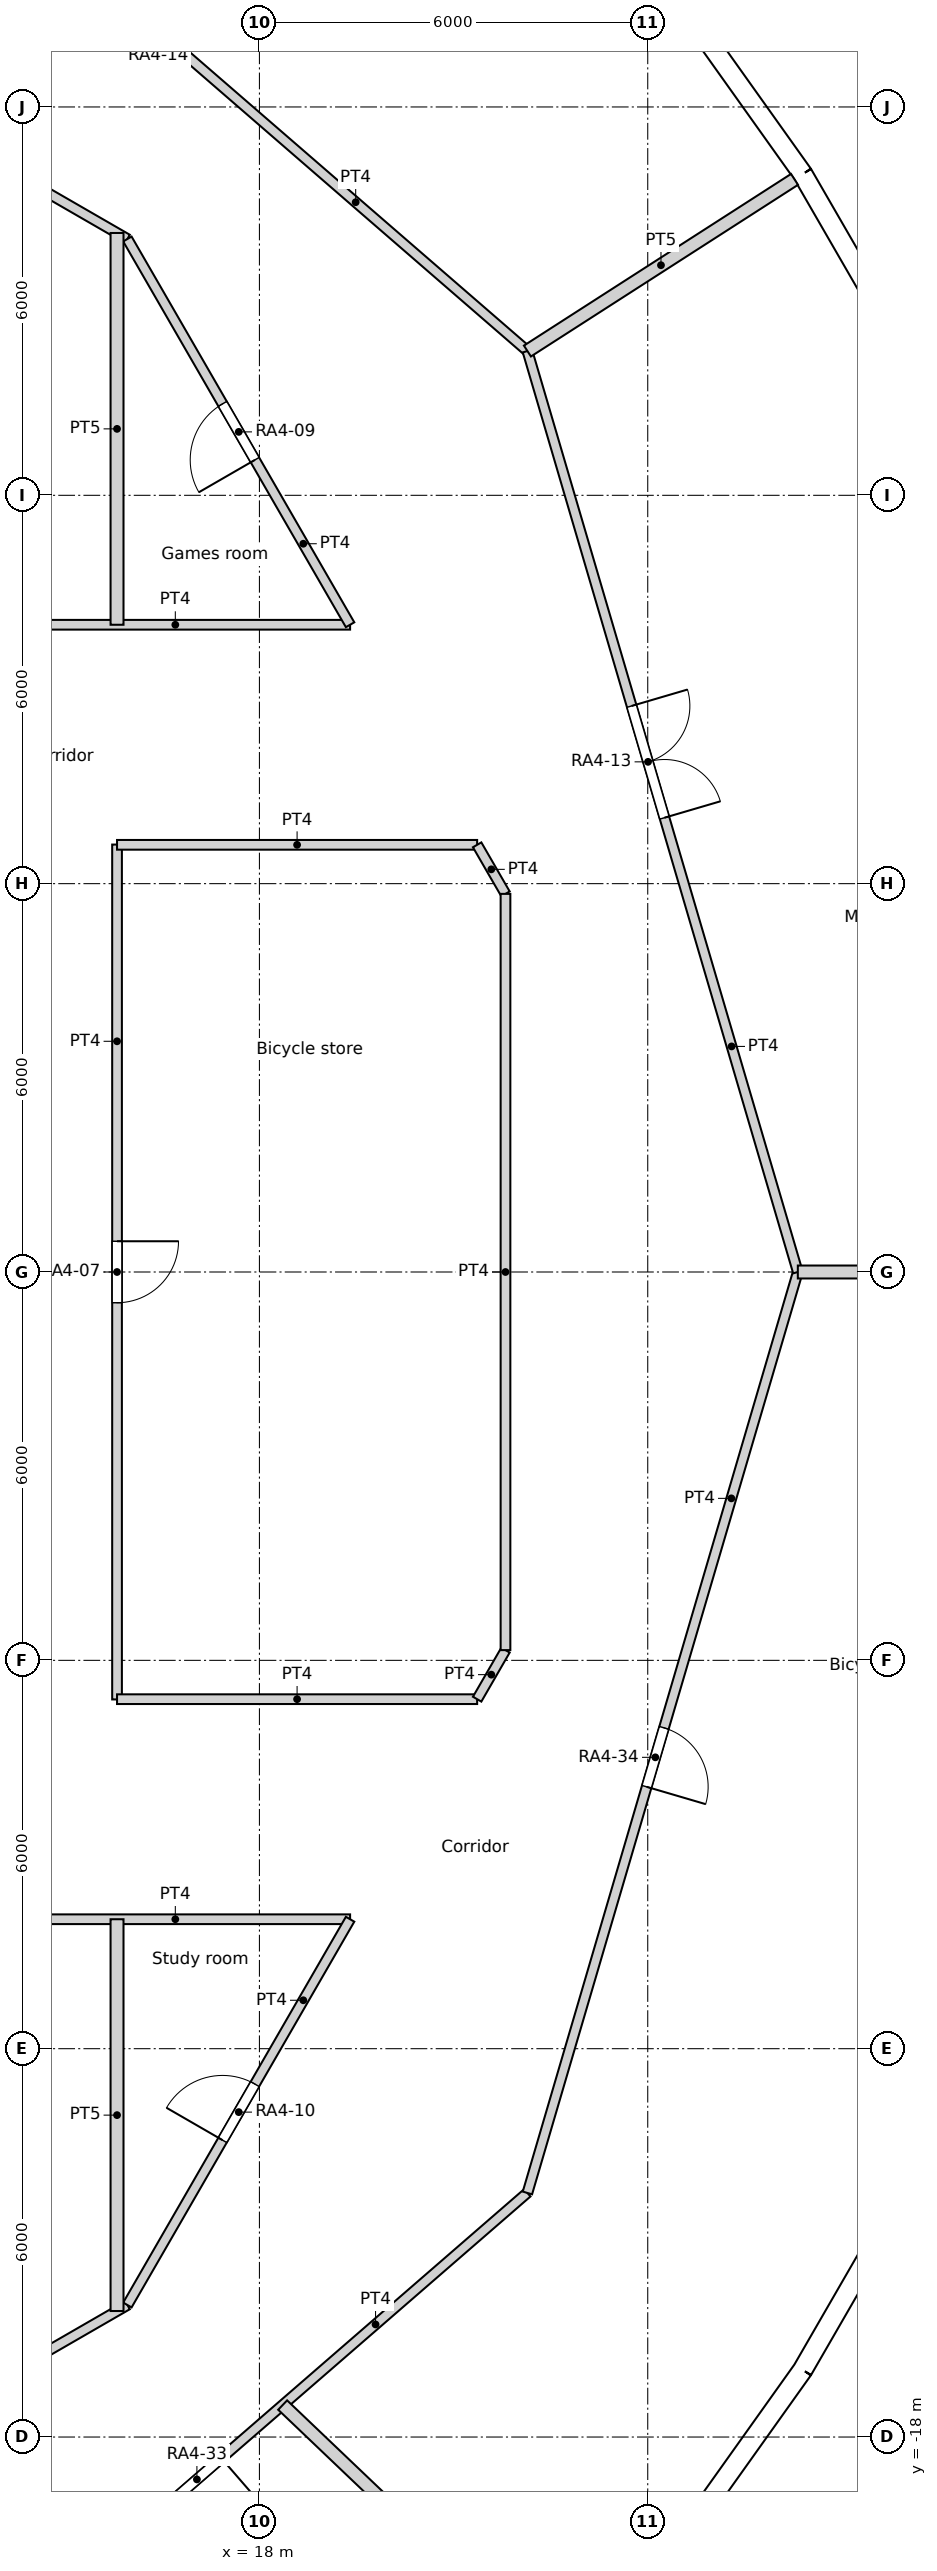
"""IFC4 building model, lengths in metres.
Left out: names, types, materials, properties, quantities, classifications, styles, units other than length and angle.
Written with IfcOpenShell. Run it as: python <this file> out.ifc"""

import sys

from ifc_helpers import new_model, si_unit, direction, frame, frame_2d, origin, origin_2d, place, context, subcontext, project, spatial, rectangle, circle, extrude, element, fill, save


model = new_model("IFC4")
c1 = context("Model", 3, precision=1e-05, world=origin(), true_north=direction((0.0, 1.0)))
c2 = subcontext(c1, "Body", "Model", "MODEL_VIEW")
j1 = project(units=[si_unit("LENGTHUNIT", "METRE"), si_unit("PLANEANGLEUNIT", "RADIAN")], contexts=[c1])
p1 = place(None, origin())
s1 = spatial("IfcSite", under=j1, at=p1, CompositionType="ELEMENT")
p2 = place(p1, origin())
s2 = spatial("IfcBuilding", under=s1, at=p2, CompositionType="ELEMENT")
p3 = place(p2, frame((0.0, 0.0, 60.6)))
s3 = spatial("IfcBuildingStorey", under=s2, at=p3, CompositionType="ELEMENT", Elevation=60.6)
for number, where, z_axis, x_axis in (
    (1, (25.469, 16.368, 0.0), (0.0, 0.0, 1.0), (1.0, 0.0, 0.0)),
    (2, (25.469, -16.368, 0.0), (0.0, 0.0, 1.0), (1.0, 0.0, 0.0)),
):
    element("IfcColumn", number, at=place(p3, frame(where, z_axis=z_axis, x_axis=x_axis)), inside=s3, PredefinedType="COLUMN", context=c2, shape_type="SweptSolid", body=[
        extrude(circle(Radius=0.7, at=origin_2d()), origin(), (0.0, 0.0, 1.0), 3.6),
    ])
for number, where, z_axis, x_axis in (
    (3, (24.548, 0.0, 0.0), (0.0, 0.0, 1.0), (1.0, 0.0, 0.0)),
    (4, (23.886, 5.661, 0.0), (0.0, 0.0, 1.0), (1.0, 0.0, 0.0)),
    (5, (21.937, 11.017, 0.0), (0.0, 0.0, 1.0), (1.0, 0.0, 0.0)),
    (6, (18.805, 15.779, 0.0), (0.0, 0.0, 1.0), (1.0, 0.0, 0.0)),
    (7, (18.805, -15.779, 0.0), (0.0, 0.0, 1.0), (1.0, 0.0, 0.0)),
    (8, (21.937, -11.017, 0.0), (0.0, 0.0, 1.0), (1.0, 0.0, 0.0)),
    (9, (23.886, -5.661, 0.0), (0.0, 0.0, 1.0), (1.0, 0.0, 0.0)),
):
    element("IfcColumn", number, at=place(p3, frame(where, z_axis=z_axis, x_axis=x_axis)), inside=s3, PredefinedType="COLUMN", context=c2, shape_type="SweptSolid", body=[
        extrude(circle(Radius=0.75, at=origin_2d()), origin(), (0.0, 0.0, 1.0), 3.6),
    ])
for number, where, z_axis, x_axis in (
    (10, (18.822, 0.0, 0.0), (0.0, 0.0, 1.0), (1.0, 0.0, 0.0)),
    (11, (17.986, 5.548, 0.0), (0.0, 0.0, 1.0), (1.0, 0.0, 0.0)),
    (12, (15.552, 10.603, 0.0), (0.0, 0.0, 1.0), (1.0, 0.0, 0.0)),
    (13, (15.552, -10.603, 0.0), (0.0, 0.0, 1.0), (1.0, 0.0, 0.0)),
    (14, (17.986, -5.548, 0.0), (0.0, 0.0, 1.0), (1.0, 0.0, 0.0)),
):
    element("IfcColumn", number, at=place(p3, frame(where, z_axis=z_axis, x_axis=x_axis)), inside=s3, PredefinedType="COLUMN", context=c2, shape_type="SweptSolid", body=[
        extrude(circle(Radius=0.8, at=origin_2d()), origin(), (0.0, 0.0, 1.0), 3.6),
    ])
p4 = place(p3, frame((27.884, 14.382, 0.0), z_axis=(0.0, 0.0, 1.0), x_axis=(-0.500025049464, 0.866010940986, 0.0)))
e15 = element("IfcWall", 15, at=p4, inside=s3, PredefinedType="SOLIDWALL", context=c2, shape_type="SweptSolid", body=[
    extrude(rectangle(XDim=2.98, YDim=0.3, at=frame_2d((1.49, 0.0))), origin(), (0.0, 0.0, 1.0), 2.65),
])
p5 = place(p4, frame((1.49, 0.0, 1.55)))
e16 = element("IfcOpeningElement", 16, at=p5, cuts=e15, PredefinedType="OPENING", context=c2, shape_type="SweptSolid", body=[
    extrude(circle(Radius=0.9, at=origin_2d()), frame((0.0, 0.16, 0.0), z_axis=(0.0, -1.0, 0.0), x_axis=(1.0, 0.0, 0.0)), (0.0, 0.0, 1.0), 0.32),
])
p6 = place(p3, frame((26.394, 16.962, 0.0), z_axis=(0.0, 0.0, 1.0), x_axis=(-0.580059407678, 0.81457417315, 0.0)))
e17 = element("IfcWall", 17, at=p6, inside=s3, PredefinedType="SOLIDWALL", context=c2, shape_type="SweptSolid", body=[
    extrude(rectangle(XDim=2.979, YDim=0.3, at=frame_2d((1.49, 0.0))), origin(), (0.0, 0.0, 1.0), 3.15),
])
p7 = place(p6, frame((1.49, 0.0, 1.55)))
e18 = element("IfcOpeningElement", 18, at=p7, cuts=e17, PredefinedType="OPENING", context=c2, shape_type="SweptSolid", body=[
    extrude(circle(Radius=0.9, at=origin_2d()), frame((0.0, 0.16, 0.0), z_axis=(0.0, -1.0, 0.0), x_axis=(1.0, 0.0, 0.0)), (0.0, 0.0, 1.0), 0.32),
])
p8 = place(p3, frame((24.666, -19.389, 0.0), z_axis=(0.0, 0.0, 1.0), x_axis=(0.580059407678, 0.81457417315, 0.0)))
e19 = element("IfcWall", 19, at=p8, inside=s3, PredefinedType="SOLIDWALL", context=c2, shape_type="SweptSolid", body=[
    extrude(rectangle(XDim=2.979, YDim=0.3, at=frame_2d((1.49, 0.0))), origin(), (0.0, 0.0, 1.0), 2.65),
])
p9 = place(p8, frame((1.49, 0.0, 1.55)))
e20 = element("IfcOpeningElement", 20, at=p9, cuts=e19, PredefinedType="OPENING", context=c2, shape_type="SweptSolid", body=[
    extrude(circle(Radius=0.9, at=origin_2d()), frame((0.0, 0.16, 0.0), z_axis=(0.0, -1.0, 0.0), x_axis=(1.0, 0.0, 0.0)), (0.0, 0.0, 1.0), 0.32),
])
p10 = place(p3, frame((26.394, -16.962, 0.0), z_axis=(0.0, 0.0, 1.0), x_axis=(0.500025049464, 0.866010940986, 0.0)))
e21 = element("IfcWall", 21, at=p10, inside=s3, PredefinedType="SOLIDWALL", context=c2, shape_type="SweptSolid", body=[
    extrude(rectangle(XDim=2.98, YDim=0.3, at=frame_2d((1.49, 0.0))), origin(), (0.0, 0.0, 1.0), 3.15),
])
p11 = place(p10, frame((1.49, 0.0, 1.55)))
e22 = element("IfcOpeningElement", 22, at=p11, cuts=e21, PredefinedType="OPENING", context=c2, shape_type="SweptSolid", body=[
    extrude(circle(Radius=0.9, at=origin_2d()), frame((0.0, 0.16, 0.0), z_axis=(0.0, -1.0, 0.0), x_axis=(1.0, 0.0, 0.0)), (0.0, 0.0, 1.0), 0.32),
])
for number, where, z_axis, x_axis in (
    (23, (14.0, 10.0, 0.0), (0.0, 0.0, 1.0), (1.0, 0.0, 0.0)),
    (24, (14.0, -10.0, 0.0), (0.0, 0.0, 1.0), (1.0, 0.0, 0.0)),
):
    element("IfcWall", number, at=place(p3, frame(where, z_axis=z_axis, x_axis=x_axis)), inside=s3, PredefinedType="PARTITIONING", context=c2, shape_type="SweptSolid", body=[
        extrude(rectangle(XDim=5.401, YDim=0.15, at=frame_2d((2.7, 0.0))), origin(), (0.0, 0.0, 1.0), 3.15),
    ])
p12 = place(p3, frame((15.8, -6.604, 0.0), z_axis=(0.0, 0.0, 1.0), x_axis=(0.0, 1.0, 0.0)))
e25 = element("IfcWall", 25, at=p12, inside=s3, PredefinedType="PARTITIONING", context=c2, shape_type="SweptSolid", body=[
    extrude(rectangle(XDim=13.208, YDim=0.15, at=frame_2d((6.604, 0.0))), origin(), (0.0, 0.0, 1.0), 3.15),
])
p13 = place(p12, frame((6.129, 0.0, 0.0)))
e26 = element("IfcOpeningElement", 26, at=p13, cuts=e25, PredefinedType="OPENING", context=c2, shape_type="SweptSolid", body=[
    extrude(rectangle(XDim=0.95, YDim=2.1, at=frame_2d((0.475, 1.05))), frame((0.0, 0.075, 0.0), z_axis=(0.0, -1.0, 0.0), x_axis=(1.0, 0.0, 0.0)), (0.0, 0.0, 1.0), 0.15),
])
p14 = place(p3, frame((15.8, -6.6, 0.0), z_axis=(0.0, 0.0, 1.0), x_axis=(1.0, 0.0, 0.0)))
e27 = element("IfcWall", 27, at=p14, inside=s3, PredefinedType="PARTITIONING", context=c2, shape_type="SweptSolid", body=[
    extrude(rectangle(XDim=5.564, YDim=0.15, at=frame_2d((2.782, 0.0))), origin(), (0.0, 0.0, 1.0), 3.15),
])
p15 = place(p3, frame((21.364, -6.6, 0.0), z_axis=(0.0, 0.0, 1.0), x_axis=(0.500277597875, 0.865865073245, 0.0)))
e28 = element("IfcWall", 28, at=p15, inside=s3, PredefinedType="PARTITIONING", context=c2, shape_type="SweptSolid", body=[
    extrude(rectangle(XDim=0.875, YDim=0.15, at=frame_2d((0.438, 0.0))), origin(), (0.0, 0.0, 1.0), 3.15),
])
p16 = place(p3, frame((21.802, -5.842, 0.0), z_axis=(0.0, 0.0, 1.0), x_axis=(0.0, 1.0, 0.0)))
e29 = element("IfcWall", 29, at=p16, inside=s3, PredefinedType="PARTITIONING", context=c2, shape_type="SweptSolid", body=[
    extrude(rectangle(XDim=11.684, YDim=0.15, at=frame_2d((5.842, 0.0))), origin(), (0.0, 0.0, 1.0), 3.15),
])
p17 = place(p3, frame((21.364, 6.6, 0.0), z_axis=(0.0, 0.0, 1.0), x_axis=(0.500277597875, -0.865865073245, 0.0)))
e30 = element("IfcWall", 30, at=p17, inside=s3, PredefinedType="PARTITIONING", context=c2, shape_type="SweptSolid", body=[
    extrude(rectangle(XDim=0.875, YDim=0.15, at=frame_2d((0.438, 0.0))), origin(), (0.0, 0.0, 1.0), 3.15),
])
p18 = place(p3, frame((15.8, 6.6, 0.0), z_axis=(0.0, 0.0, 1.0), x_axis=(1.0, 0.0, 0.0)))
e31 = element("IfcWall", 31, at=p18, inside=s3, PredefinedType="PARTITIONING", context=c2, shape_type="SweptSolid", body=[
    extrude(rectangle(XDim=5.564, YDim=0.15, at=frame_2d((2.782, 0.0))), origin(), (0.0, 0.0, 1.0), 3.15),
])
p19 = place(p3, frame((15.96, 15.96, 0.0), z_axis=(0.0, 0.0, 1.0), x_axis=(0.499992689227, -0.86602962462, 0.0)))
e32 = element("IfcWall", 32, at=p19, inside=s3, PredefinedType="PARTITIONING", context=c2, shape_type="SweptSolid", body=[
    extrude(rectangle(XDim=6.882, YDim=0.15, at=frame_2d((3.441, 0.0))), origin(), (0.0, 0.0, 1.0), 3.15),
])
p20 = place(p19, frame((2.941, 0.0, 0.0)))
e33 = element("IfcOpeningElement", 33, at=p20, cuts=e32, PredefinedType="OPENING", context=c2, shape_type="SweptSolid", body=[
    extrude(rectangle(XDim=1.0, YDim=2.04, at=frame_2d((0.5, 1.02))), frame((0.0, 0.075, 0.0), z_axis=(0.0, -1.0, 0.0), x_axis=(1.0, 0.0, 0.0)), (0.0, 0.0, 1.0), 0.15),
])
p21 = place(p3, frame((15.96, -15.96, 0.0), z_axis=(0.0, 0.0, 1.0), x_axis=(0.499992689227, 0.86602962462, 0.0)))
e34 = element("IfcWall", 34, at=p21, inside=s3, PredefinedType="PARTITIONING", context=c2, shape_type="SweptSolid", body=[
    extrude(rectangle(XDim=6.882, YDim=0.15, at=frame_2d((3.441, 0.0))), origin(), (0.0, 0.0, 1.0), 3.15),
])
p22 = place(p21, frame((2.941, 0.0, 0.0)))
e35 = element("IfcOpeningElement", 35, at=p22, cuts=e34, PredefinedType="OPENING", context=c2, shape_type="SweptSolid", body=[
    extrude(rectangle(XDim=1.0, YDim=2.04, at=frame_2d((0.5, 1.02))), frame((0.0, 0.075, 0.0), z_axis=(0.0, -1.0, 0.0), x_axis=(1.0, 0.0, 0.0)), (0.0, 0.0, 1.0), 0.15),
])
p23 = place(p3, frame((22.141, 14.229, 0.0), z_axis=(0.0, 0.0, 1.0), x_axis=(0.281730446162, -0.959493593363, 0.0)))
e36 = element("IfcWall", 36, at=p23, inside=s3, PredefinedType="PARTITIONING", context=c2, shape_type="SweptSolid", body=[
    extrude(rectangle(XDim=14.83, YDim=0.15, at=frame_2d((7.415, 0.0))), origin(), (0.0, 0.0, 1.0), 3.15),
])
p24 = place(p23, frame((5.715, 0.0, 0.0)))
e37 = element("IfcOpeningElement", 37, at=p24, cuts=e36, PredefinedType="OPENING", context=c2, shape_type="SweptSolid", body=[
    extrude(rectangle(XDim=1.8, YDim=2.1, at=frame_2d((0.9, 1.05))), frame((0.0, 0.075, 0.0), z_axis=(0.0, -1.0, 0.0), x_axis=(1.0, 0.0, 0.0)), (0.0, 0.0, 1.0), 0.15),
])
p25 = place(p3, frame((10.933, 23.94, 0.0), z_axis=(0.0, 0.0, 1.0), x_axis=(0.755770011705, -0.654837147242, 0.0)))
e38 = element("IfcWall", 38, at=p25, inside=s3, PredefinedType="PARTITIONING", context=c2, shape_type="SweptSolid", body=[
    extrude(rectangle(XDim=14.83, YDim=0.15, at=frame_2d((7.415, 0.0))), origin(), (0.0, 0.0, 1.0), 3.15),
])
p26 = place(p25, frame((6.807, 0.0, 0.0)))
e39 = element("IfcOpeningElement", 39, at=p26, cuts=e38, PredefinedType="OPENING", context=c2, shape_type="SweptSolid", body=[
    extrude(rectangle(XDim=0.95, YDim=2.1, at=frame_2d((0.475, 1.05))), frame((0.0, 0.075, 0.0), z_axis=(0.0, -1.0, 0.0), x_axis=(1.0, 0.0, 0.0)), (0.0, 0.0, 1.0), 0.15),
])
p27 = place(p3, frame((13.247, -21.939, 0.0), z_axis=(0.0, 0.0, 1.0), x_axis=(0.755420750547, 0.655240024451, 0.0)))
e40 = element("IfcWall", 40, at=p27, inside=s3, PredefinedType="PARTITIONING", context=c2, shape_type="SweptSolid", body=[
    extrude(rectangle(XDim=11.771, YDim=0.15, at=frame_2d((5.885, 0.0))), origin(), (0.0, 0.0, 1.0), 3.15),
])
p28 = place(p27, frame((4.513, 0.0, 0.0)))
e41 = element("IfcOpeningElement", 41, at=p28, cuts=e40, PredefinedType="OPENING", context=c2, shape_type="SweptSolid", body=[
    extrude(rectangle(XDim=1.0, YDim=2.1, at=frame_2d((0.5, 1.05))), frame((0.0, 0.075, 0.0), z_axis=(0.0, -1.0, 0.0), x_axis=(1.0, 0.0, 0.0)), (0.0, 0.0, 1.0), 0.15),
])
p29 = place(p3, frame((22.141, -14.229, 0.0), z_axis=(0.0, 0.0, 1.0), x_axis=(0.281730446162, 0.959493593363, 0.0)))
e42 = element("IfcWall", 42, at=p29, inside=s3, PredefinedType="PARTITIONING", context=c2, shape_type="SweptSolid", body=[
    extrude(rectangle(XDim=14.83, YDim=0.15, at=frame_2d((7.415, 0.0))), origin(), (0.0, 0.0, 1.0), 3.15),
])
p30 = place(p29, frame((6.54, 0.0, 0.0)))
e43 = element("IfcOpeningElement", 43, at=p30, cuts=e42, PredefinedType="OPENING", context=c2, shape_type="SweptSolid", body=[
    extrude(rectangle(XDim=0.95, YDim=2.1, at=frame_2d((0.475, 1.05))), frame((0.0, 0.075, 0.0), z_axis=(0.0, -1.0, 0.0), x_axis=(1.0, 0.0, 0.0)), (0.0, 0.0, 1.0), 0.15),
])
for number, where, z_axis, x_axis in (
    (44, (11.336, 18.63, 0.0), (0.0, 0.0, 1.0), (0.866, -0.5, 0.0)),
    (45, (11.336, -18.63, 0.0), (0.0, 0.0, 1.0), (0.866, 0.5, 0.0)),
):
    element("IfcWall", number, at=place(p3, frame(where, z_axis=z_axis, x_axis=x_axis)), inside=s3, PredefinedType="PARTITIONING", context=c2, shape_type="SweptSolid", body=[
        extrude(rectangle(XDim=5.339, YDim=0.15, at=frame_2d((2.67, 0.0))), origin(), (0.0, 0.0, 1.0), 3.15),
    ])
for number, where, z_axis, x_axis in (
    (46, (15.8, 10.0, 0.0), (0.0, 0.0, 1.0), (0.0, 1.0, 0.0)),
    (47, (15.8, -16.053, 0.0), (0.0, 0.0, 1.0), (0.0, 1.0, 0.0)),
):
    element("IfcWall", number, at=place(p3, frame(where, z_axis=z_axis, x_axis=x_axis)), inside=s3, PredefinedType="PARTITIONING", context=c2, shape_type="SweptSolid", body=[
        extrude(rectangle(XDim=6.053, YDim=0.2, at=frame_2d((3.026, 0.0))), origin(), (0.0, 0.0, 1.0), 3.15),
    ])
p31 = place(p3, frame((22.141, 14.229, 0.0), z_axis=(0.0, 0.0, 1.0), x_axis=(0.841265781699, 0.540621757371, 0.0)))
e48 = element("IfcWall", 48, at=p31, inside=s3, PredefinedType="PARTITIONING", context=c2, shape_type="SweptSolid", body=[
    extrude(rectangle(XDim=4.906, YDim=0.2, at=frame_2d((2.453, 0.0))), origin(), (0.0, 0.0, 1.0), 3.15),
])
p32 = place(p3, frame((26.319, 0.0, 0.0), z_axis=(0.0, 0.0, 1.0), x_axis=(1.0, 0.0, 0.0)))
e49 = element("IfcWall", 49, at=p32, inside=s3, PredefinedType="PARTITIONING", context=c2, shape_type="SweptSolid", body=[
    extrude(rectangle(XDim=4.905, YDim=0.2, at=frame_2d((2.453, 0.0))), origin(), (0.0, 0.0, 1.0), 3.15),
])
p33 = place(p3, frame((18.359, -17.506, 0.0), z_axis=(0.0, 0.0, 1.0), x_axis=(0.723808715798, -0.690000683286, 0.0)))
e50 = element("IfcWall", 50, at=p33, inside=s3, PredefinedType="PARTITIONING", context=c2, shape_type="SweptSolid", body=[
    extrude(rectangle(XDim=5.856, YDim=0.2, at=frame_2d((2.928, 0.0))), origin(), (0.0, 0.0, 1.0), 3.15),
])
p34 = place(p5, origin())
e51 = element("IfcWindow", 51, at=p34, inside=s3, PartitioningType="SINGLE_PANEL", PredefinedType="WINDOW", context=c2, shape_type="SweptSolid", body=[
    extrude(circle(Radius=0.9, at=origin_2d()), frame((0.0, 0.12, 0.0), z_axis=(0.0, -1.0, 0.0), x_axis=(1.0, 0.0, 0.0)), (0.0, 0.0, 1.0), 0.1),
])
fill(e16, e51)
p35 = place(p7, origin())
e52 = element("IfcWindow", 52, at=p35, inside=s3, PartitioningType="SINGLE_PANEL", PredefinedType="WINDOW", context=c2, shape_type="SweptSolid", body=[
    extrude(circle(Radius=0.9, at=origin_2d()), frame((0.0, 0.12, 0.0), z_axis=(0.0, -1.0, 0.0), x_axis=(1.0, 0.0, 0.0)), (0.0, 0.0, 1.0), 0.1),
])
fill(e18, e52)
p36 = place(p9, origin())
e53 = element("IfcWindow", 53, at=p36, inside=s3, PartitioningType="SINGLE_PANEL", PredefinedType="WINDOW", context=c2, shape_type="SweptSolid", body=[
    extrude(circle(Radius=0.9, at=origin_2d()), frame((0.0, 0.12, 0.0), z_axis=(0.0, -1.0, 0.0), x_axis=(1.0, 0.0, 0.0)), (0.0, 0.0, 1.0), 0.1),
])
fill(e20, e53)
p37 = place(p11, origin())
e54 = element("IfcWindow", 54, at=p37, inside=s3, PartitioningType="SINGLE_PANEL", PredefinedType="WINDOW", context=c2, shape_type="SweptSolid", body=[
    extrude(circle(Radius=0.9, at=origin_2d()), frame((0.0, 0.12, 0.0), z_axis=(0.0, -1.0, 0.0), x_axis=(1.0, 0.0, 0.0)), (0.0, 0.0, 1.0), 0.1),
])
fill(e22, e54)
p38 = place(p13, origin())
e55 = element("IfcDoor", 55, at=p38, inside=s3, OperationType="SINGLE_SWING_LEFT", PredefinedType="DOOR", context=c2, shape_type="SweptSolid", body=[
    extrude(rectangle(XDim=0.95, YDim=2.1, at=frame_2d((0.475, 1.05))), frame((0.0, 0.025, 0.0), z_axis=(0.0, -1.0, 0.0), x_axis=(1.0, 0.0, 0.0)), (0.0, 0.0, 1.0), 0.05),
])
fill(e26, e55)
p39 = place(p20, origin())
e56 = element("IfcDoor", 56, at=p39, inside=s3, OperationType="SINGLE_SWING_LEFT", PredefinedType="DOOR", context=c2, shape_type="SweptSolid", body=[
    extrude(rectangle(XDim=1.0, YDim=2.04, at=frame_2d((0.5, 1.02))), frame((0.0, 0.025, 0.0), z_axis=(0.0, -1.0, 0.0), x_axis=(1.0, 0.0, 0.0)), (0.0, 0.0, 1.0), 0.05),
])
fill(e33, e56)
p40 = place(p22, origin())
e57 = element("IfcDoor", 57, at=p40, inside=s3, OperationType="SINGLE_SWING_LEFT", PredefinedType="DOOR", context=c2, shape_type="SweptSolid", body=[
    extrude(rectangle(XDim=1.0, YDim=2.04, at=frame_2d((0.5, 1.02))), frame((0.0, 0.025, 0.0), z_axis=(0.0, -1.0, 0.0), x_axis=(1.0, 0.0, 0.0)), (0.0, 0.0, 1.0), 0.05),
])
fill(e35, e57)
p41 = place(p24, origin())
e58 = element("IfcDoor", 58, at=p41, inside=s3, OperationType="DOUBLE_DOOR_SINGLE_SWING", PredefinedType="DOOR", context=c2, shape_type="SweptSolid", body=[
    extrude(rectangle(XDim=1.8, YDim=2.1, at=frame_2d((0.9, 1.05))), frame((0.0, 0.025, 0.0), z_axis=(0.0, -1.0, 0.0), x_axis=(1.0, 0.0, 0.0)), (0.0, 0.0, 1.0), 0.05),
])
fill(e37, e58)
p42 = place(p26, origin())
e59 = element("IfcDoor", 59, at=p42, inside=s3, OperationType="SINGLE_SWING_RIGHT", PredefinedType="DOOR", context=c2, shape_type="SweptSolid", body=[
    extrude(rectangle(XDim=0.95, YDim=2.1, at=frame_2d((0.475, 1.05))), frame((0.0, 0.025, 0.0), z_axis=(0.0, -1.0, 0.0), x_axis=(1.0, 0.0, 0.0)), (0.0, 0.0, 1.0), 0.05),
])
fill(e39, e59)
p43 = place(p28, origin())
e60 = element("IfcDoor", 60, at=p43, inside=s3, OperationType="SINGLE_SWING_LEFT", PredefinedType="DOOR", context=c2, shape_type="SweptSolid", body=[
    extrude(rectangle(XDim=1.0, YDim=2.1, at=frame_2d((0.5, 1.05))), frame((0.0, 0.025, 0.0), z_axis=(0.0, -1.0, 0.0), x_axis=(1.0, 0.0, 0.0)), (0.0, 0.0, 1.0), 0.05),
])
fill(e41, e60)
p44 = place(p30, origin())
e61 = element("IfcDoor", 61, at=p44, inside=s3, OperationType="SINGLE_SWING_RIGHT", PredefinedType="DOOR", context=c2, shape_type="SweptSolid", body=[
    extrude(rectangle(XDim=0.95, YDim=2.1, at=frame_2d((0.475, 1.05))), frame((0.0, 0.025, 0.0), z_axis=(0.0, -1.0, 0.0), x_axis=(1.0, 0.0, 0.0)), (0.0, 0.0, 1.0), 0.05),
])
fill(e43, e61)
save(model, sys.argv[1])
